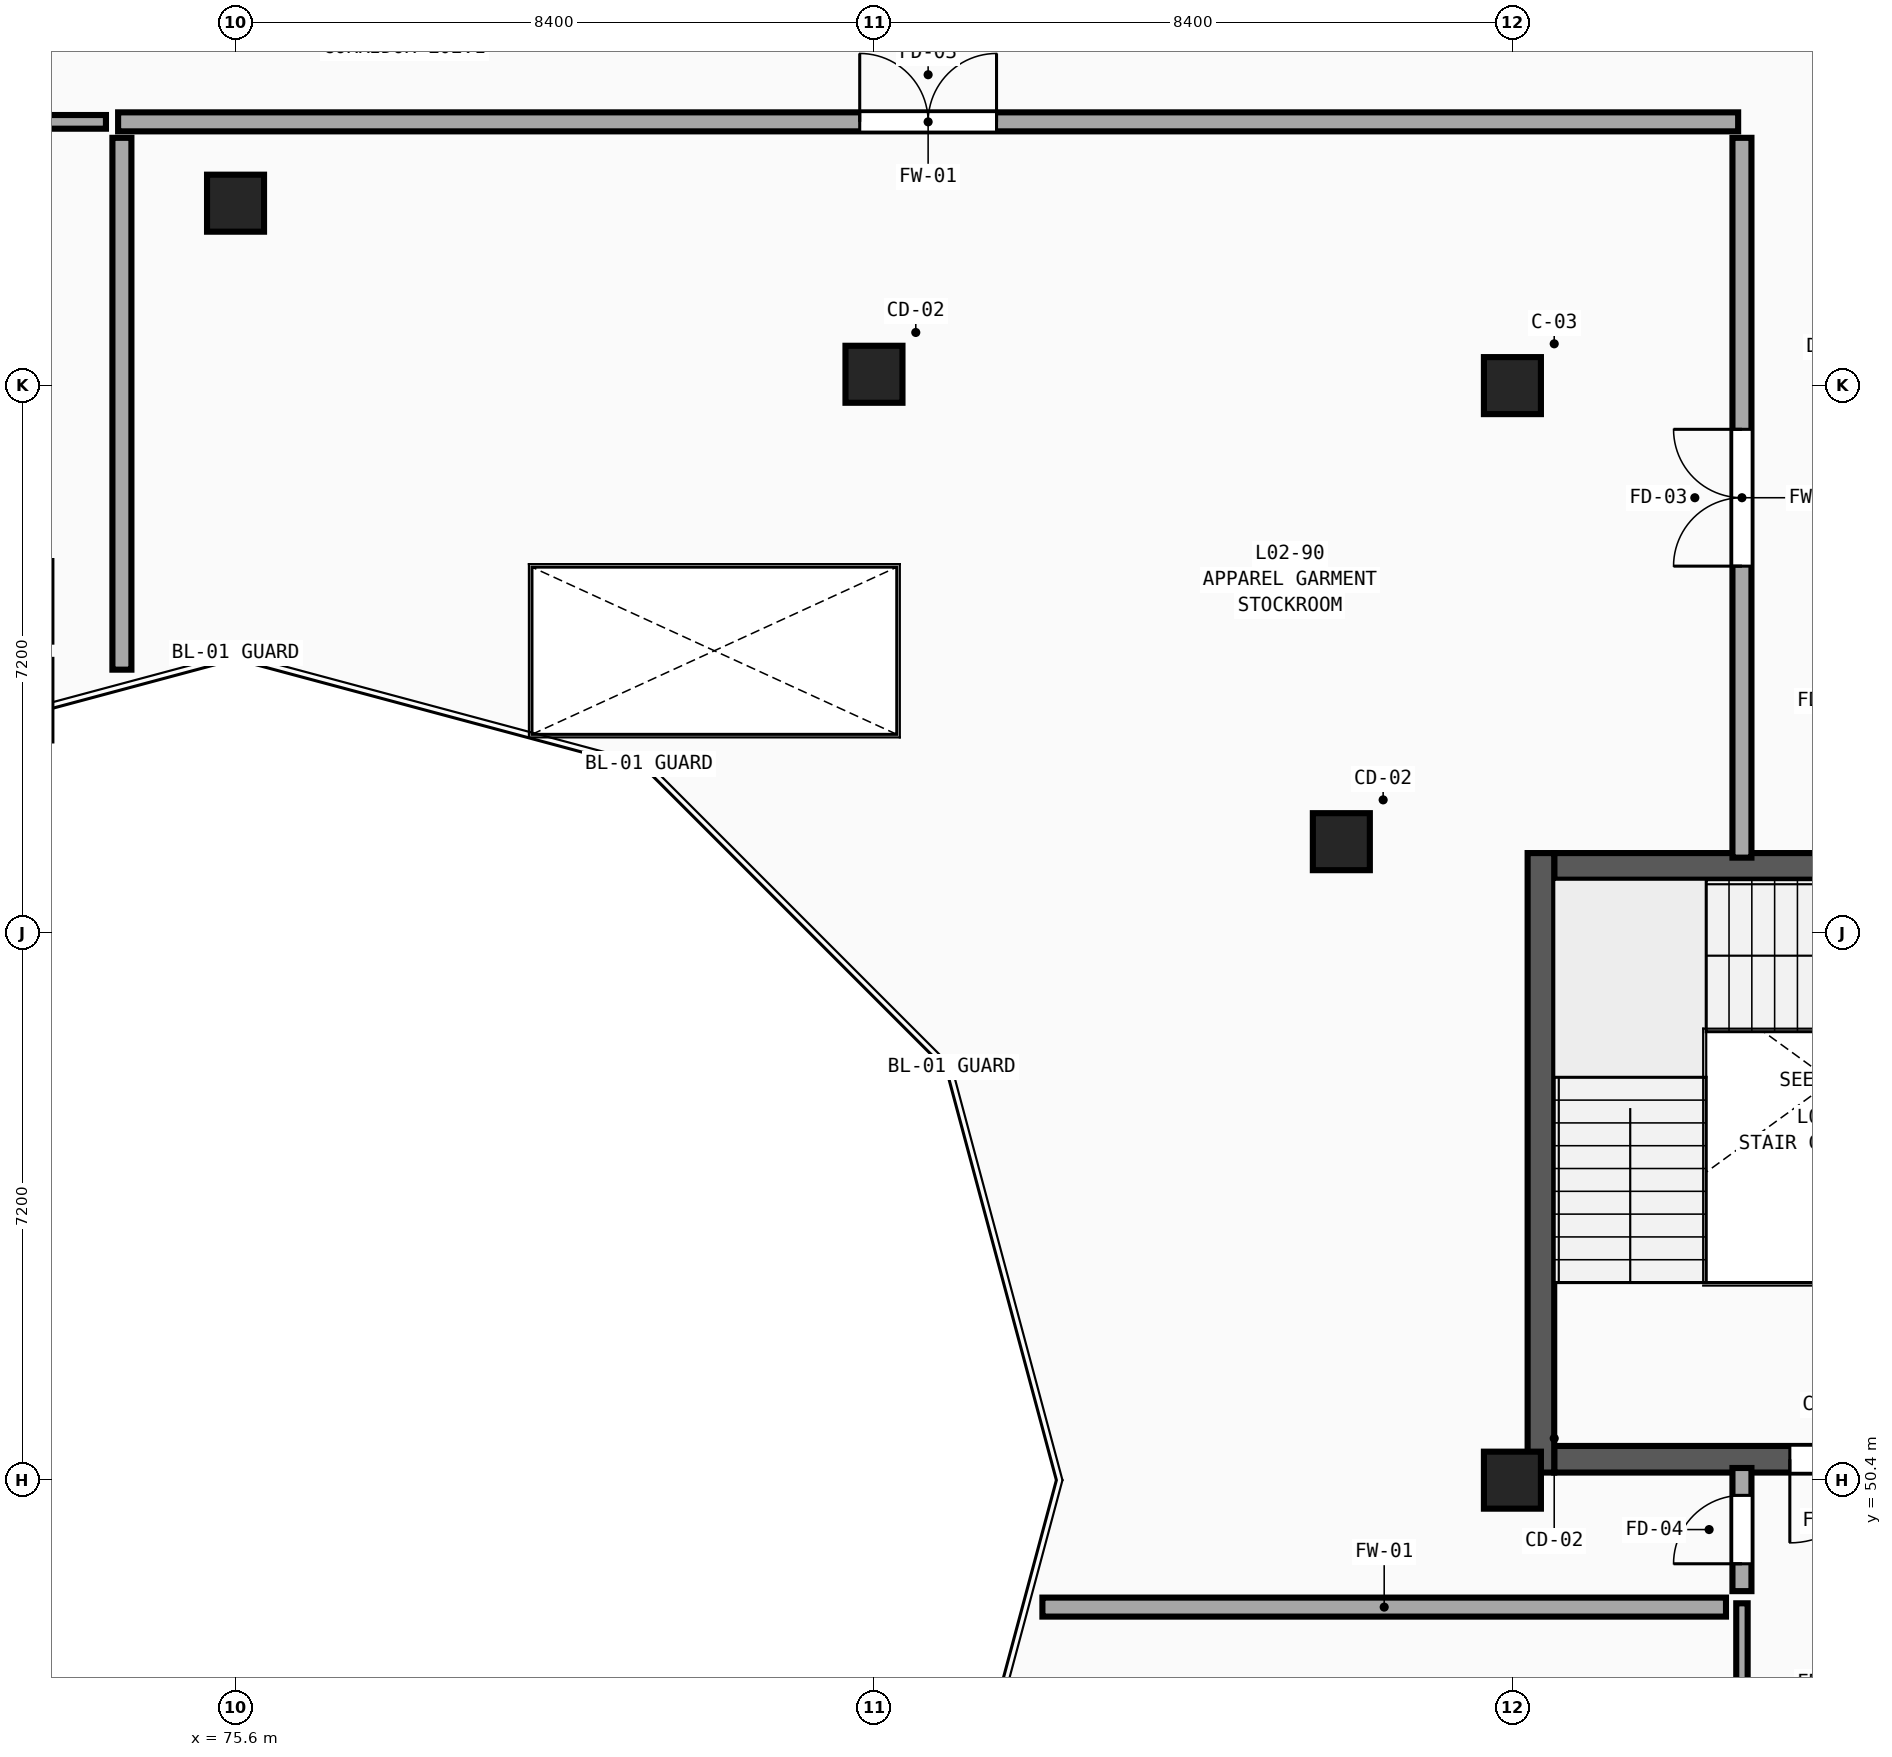
"""IFC4 building model, lengths in metres.
Left out: names, types, materials, properties, quantities, classifications, styles, units other than length and angle.
Written with IfcOpenShell. Run it as: python <this file> out.ifc"""

import sys

from ifc_helpers import new_model, si_unit, direction, frame, frame_2d, origin, origin_2d, place, context, subcontext, project, spatial, rectangle, circle, extrude, element, fill, save


model = new_model("IFC4")
c1 = context("Model", 3, precision=1e-05, world=origin(), true_north=direction((0.0, 1.0)))
c2 = subcontext(c1, "Body", "Model", "MODEL_VIEW")
j1 = project(units=[si_unit("LENGTHUNIT", "METRE"), si_unit("PLANEANGLEUNIT", "RADIAN")], contexts=[c1])
p1 = place(None, origin())
s1 = spatial("IfcSite", under=j1, at=p1, CompositionType="ELEMENT")
p2 = place(p1, origin())
s2 = spatial("IfcBuilding", under=s1, at=p2, CompositionType="ELEMENT")
p3 = place(p2, frame((0.0, 0.0, 9.9)))
s3 = spatial("IfcBuildingStorey", under=s2, at=p3, CompositionType="ELEMENT", Elevation=9.9)
p4 = place(p3, frame((92.4, 64.8, 0.0), z_axis=(0.0, 0.0, 1.0), x_axis=(1.0, 0.0, 0.0)))
e1 = element("IfcColumn", 1, at=p4, inside=s3, PredefinedType="COLUMN", context=c2, shape_type="SweptSolid", body=[
    extrude(rectangle(XDim=0.75, YDim=0.75, at=origin_2d()), origin(), (0.0, 0.0, 1.0), 4.5),
])
for number, where, z_axis, x_axis in (
    (2, (92.4, 50.4, 0.0), (0.0, 0.0, 1.0), (1.0, 0.0, 0.0)),
    (3, (90.149, 58.8, 0.0), (0.0, 0.0, 1.0), (1.0, 0.0, 0.0)),
    (4, (84.0, 64.949, 0.0), (0.0, 0.0, 1.0), (1.0, 0.0, 0.0)),
    (5, (75.6, 67.2, 0.0), (0.0, 0.0, 1.0), (1.0, 0.0, 0.0)),
):
    element("IfcColumn", number, at=place(p3, frame(where, z_axis=z_axis, x_axis=x_axis)), inside=s3, PredefinedType="COLUMN", context=c2, shape_type="SweptSolid", body=[
        extrude(circle(Radius=0.375, at=origin_2d()), origin(), (0.0, 0.0, 1.0), 4.5),
    ])
p5 = place(p3, frame((100.25, 50.675, 0.0), z_axis=(0.0, 0.0, 1.0), x_axis=(-1.0, 0.0, 0.0)))
e6 = element("IfcWall", 6, at=p5, inside=s3, PredefinedType="SHEAR", context=c2, shape_type="SweptSolid", body=[
    extrude(rectangle(XDim=7.3, YDim=0.35, at=frame_2d((3.65, 0.0))), origin(), (0.0, 0.0, 1.0), 4.5),
])
p6 = place(p5, frame((3.1, 0.0, 0.0)))
e7 = element("IfcOpeningElement", 7, at=p6, cuts=e6, PredefinedType="OPENING", context=c2, shape_type="SweptSolid", body=[
    extrude(rectangle(XDim=1.1, YDim=2.2, at=frame_2d((0.55, 1.1))), frame((0.0, 0.195, 0.0), z_axis=(0.0, -1.0, 0.0), x_axis=(1.0, 0.0, 0.0)), (0.0, 0.0, 1.0), 0.39),
])
p7 = place(p3, frame((92.95, 58.475, 0.0), z_axis=(0.0, 0.0, 1.0), x_axis=(1.0, 0.0, 0.0)))
e8 = element("IfcWall", 8, at=p7, inside=s3, PredefinedType="SHEAR", context=c2, shape_type="SweptSolid", body=[
    extrude(rectangle(XDim=7.3, YDim=0.35, at=frame_2d((3.65, 0.0))), origin(), (0.0, 0.0, 1.0), 4.5),
])
p8 = place(p3, frame((92.775, 58.65, 0.0), z_axis=(0.0, 0.0, 1.0), x_axis=(0.0, -1.0, 0.0)))
e9 = element("IfcWall", 9, at=p8, inside=s3, PredefinedType="SHEAR", context=c2, shape_type="SweptSolid", body=[
    extrude(rectangle(XDim=8.15, YDim=0.35, at=frame_2d((4.075, 0.0))), origin(), (0.0, 0.0, 1.0), 4.5),
])
p9 = place(p3, frame((74.055, 68.27, 0.0), z_axis=(0.0, 0.0, 1.0), x_axis=(1.0, 0.0, 0.0)))
e10 = element("IfcWall", 10, at=p9, inside=s3, PredefinedType="SOLIDWALL", context=c2, shape_type="SweptSolid", body=[
    extrude(rectangle(XDim=21.315, YDim=0.25, at=frame_2d((10.658, 0.0))), origin(), (0.0, 0.0, 1.0), 4.18),
])
p10 = place(p9, frame((9.758, 0.0, 0.0)))
e11 = element("IfcOpeningElement", 11, at=p10, cuts=e10, PredefinedType="OPENING", context=c2, shape_type="SweptSolid", body=[
    extrude(rectangle(XDim=1.8, YDim=2.3, at=frame_2d((0.9, 1.15))), frame((0.0, 0.145, 0.0), z_axis=(0.0, -1.0, 0.0), x_axis=(1.0, 0.0, 0.0)), (0.0, 0.0, 1.0), 0.29),
])
p11 = place(p3, frame((55.84, 68.27, 0.0), z_axis=(0.0, 0.0, 1.0), x_axis=(1.0, 0.0, 0.0)))
e12 = element("IfcWall", 12, at=p11, inside=s3, PredefinedType="PARTITIONING", context=c2, shape_type="SweptSolid", body=[
    extrude(rectangle(XDim=18.055, YDim=0.18, at=frame_2d((9.027, 0.0))), origin(), (0.0, 0.0, 1.0), 4.18),
])
p12 = place(p11, frame((8.268, 0.0, 0.0)))
e13 = element("IfcOpeningElement", 13, at=p12, cuts=e12, PredefinedType="OPENING", context=c2, shape_type="SweptSolid", body=[
    extrude(rectangle(XDim=1.52, YDim=2.37, at=frame_2d((0.76, 1.185))), frame((0.0, 0.11, 0.0), z_axis=(0.0, -1.0, 0.0), x_axis=(1.0, 0.0, 0.0)), (0.0, 0.0, 1.0), 0.22),
])
p13 = place(p3, frame((95.42, 36.37, 0.0), z_axis=(0.0, 0.0, 1.0), x_axis=(0.0, 1.0, 0.0)))
e14 = element("IfcWall", 14, at=p13, inside=s3, PredefinedType="PARTITIONING", context=c2, shape_type="SweptSolid", body=[
    extrude(rectangle(XDim=12.41, YDim=0.15, at=frame_2d((6.205, 0.0))), origin(), (0.0, 0.0, 1.0), 4.18),
])
p14 = place(p13, frame((5.365, 0.0, 0.0)))
e15 = element("IfcOpeningElement", 15, at=p14, cuts=e14, PredefinedType="OPENING", context=c2, shape_type="SweptSolid", body=[
    extrude(rectangle(XDim=1.68, YDim=2.29, at=frame_2d((0.84, 1.145))), frame((0.0, 0.095, 0.0), z_axis=(0.0, -1.0, 0.0), x_axis=(1.0, 0.0, 0.0)), (0.0, 0.0, 1.0), 0.19),
])
p15 = place(p3, frame((95.42, 58.59, 0.0), z_axis=(0.0, 0.0, 1.0), x_axis=(0.0, 1.0, 0.0)))
e16 = element("IfcWall", 16, at=p15, inside=s3, PredefinedType="SOLIDWALL", context=c2, shape_type="SweptSolid", body=[
    extrude(rectangle(XDim=9.47, YDim=0.25, at=frame_2d((4.735, 0.0))), origin(), (0.0, 0.0, 1.0), 4.18),
])
p16 = place(p15, frame((3.835, 0.0, 0.0)))
e17 = element("IfcOpeningElement", 17, at=p16, cuts=e16, PredefinedType="OPENING", context=c2, shape_type="SweptSolid", body=[
    extrude(rectangle(XDim=1.8, YDim=2.3, at=frame_2d((0.9, 1.15))), frame((0.0, 0.145, 0.0), z_axis=(0.0, -1.0, 0.0), x_axis=(1.0, 0.0, 0.0)), (0.0, 0.0, 1.0), 0.29),
])
p17 = place(p3, frame((95.42, 48.94, 0.0), z_axis=(0.0, 0.0, 1.0), x_axis=(0.0, 1.0, 0.0)))
e18 = element("IfcWall", 18, at=p17, inside=s3, PredefinedType="SOLIDWALL", context=c2, shape_type="SweptSolid", body=[
    extrude(rectangle(XDim=1.62, YDim=0.25, at=frame_2d((0.81, 0.0))), origin(), (0.0, 0.0, 1.0), 4.18),
])
p18 = place(p17, frame((0.36, 0.0, 0.0)))
e19 = element("IfcOpeningElement", 19, at=p18, cuts=e18, PredefinedType="OPENING", context=c2, shape_type="SweptSolid", body=[
    extrude(rectangle(XDim=0.9, YDim=2.1, at=frame_2d((0.45, 1.05))), frame((0.0, 0.145, 0.0), z_axis=(0.0, -1.0, 0.0), x_axis=(1.0, 0.0, 0.0)), (0.0, 0.0, 1.0), 0.29),
])
p19 = place(p3, frame((86.216, 48.73, 0.0), z_axis=(0.0, 0.0, 1.0), x_axis=(1.0, 0.0, 0.0)))
e20 = element("IfcWall", 20, at=p19, inside=s3, PredefinedType="SOLIDWALL", context=c2, shape_type="SweptSolid", body=[
    extrude(rectangle(XDim=8.994, YDim=0.25, at=frame_2d((4.497, 0.0))), origin(), (0.0, 0.0, 1.0), 4.18),
])
p20 = place(p3, frame((74.105, 61.063, 0.0), z_axis=(0.0, 0.0, 1.0), x_axis=(0.0, 1.0, 0.0)))
e21 = element("IfcWall", 21, at=p20, inside=s3, PredefinedType="SOLIDWALL", context=c2, shape_type="SweptSolid", body=[
    extrude(rectangle(XDim=6.997, YDim=0.25, at=frame_2d((3.499, 0.0))), origin(), (0.0, 0.0, 1.0), 4.18),
])
p21 = place(p6, origin())
e22 = element("IfcDoor", 22, at=p21, inside=s3, OperationType="SINGLE_SWING_RIGHT", PredefinedType="DOOR", context=c2, shape_type="SweptSolid", body=[
    extrude(rectangle(XDim=1.1, YDim=2.2, at=frame_2d((0.55, 1.1))), frame((0.0, 0.025, 0.0), z_axis=(0.0, -1.0, 0.0), x_axis=(1.0, 0.0, 0.0)), (0.0, 0.0, 1.0), 0.05),
])
fill(e7, e22)
p22 = place(p10, origin())
e23 = element("IfcDoor", 23, at=p22, inside=s3, OperationType="DOUBLE_DOOR_SINGLE_SWING", PredefinedType="DOOR", context=c2, shape_type="SweptSolid", body=[
    extrude(rectangle(XDim=1.8, YDim=2.3, at=frame_2d((0.9, 1.15))), frame((0.0, 0.025, 0.0), z_axis=(0.0, -1.0, 0.0), x_axis=(1.0, 0.0, 0.0)), (0.0, 0.0, 1.0), 0.05),
])
fill(e11, e23)
p23 = place(p16, origin())
e24 = element("IfcDoor", 24, at=p23, inside=s3, OperationType="DOUBLE_DOOR_SINGLE_SWING", PredefinedType="DOOR", context=c2, shape_type="SweptSolid", body=[
    extrude(rectangle(XDim=1.8, YDim=2.3, at=frame_2d((0.9, 1.15))), frame((0.0, 0.025, 0.0), z_axis=(0.0, -1.0, 0.0), x_axis=(1.0, 0.0, 0.0)), (0.0, 0.0, 1.0), 0.05),
])
fill(e17, e24)
p24 = place(p18, origin())
e25 = element("IfcDoor", 25, at=p24, inside=s3, OperationType="SINGLE_SWING_LEFT", PredefinedType="DOOR", context=c2, shape_type="SweptSolid", body=[
    extrude(rectangle(XDim=0.9, YDim=2.1, at=frame_2d((0.45, 1.05))), frame((0.0, 0.025, 0.0), z_axis=(0.0, -1.0, 0.0), x_axis=(1.0, 0.0, 0.0)), (0.0, 0.0, 1.0), 0.05),
])
fill(e19, e25)
save(model, sys.argv[1])
